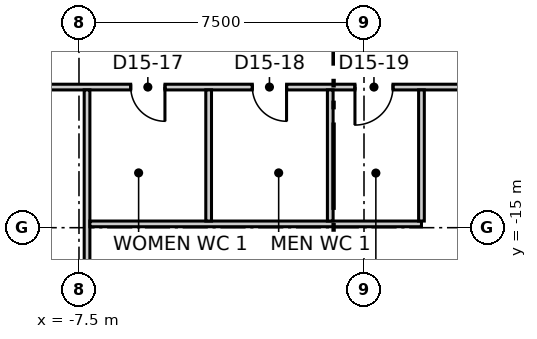
"""IFC4 building model, lengths in metres.
Left out: names, types, materials, properties, quantities, classifications, styles, units other than length and angle.
Written with IfcOpenShell. Run it as: python <this file> out.ifc"""

import sys

from ifc_helpers import new_model, si_unit, direction, frame, frame_2d, origin, place, context, subcontext, project, spatial, rectangle, extrude, element, fill, save


model = new_model("IFC4")
c1 = context("Model", 3, precision=1e-05, world=origin(), true_north=direction((0.0, 1.0)))
c2 = subcontext(c1, "Body", "Model", "MODEL_VIEW")
j1 = project(units=[si_unit("LENGTHUNIT", "METRE"), si_unit("PLANEANGLEUNIT", "RADIAN")], contexts=[c1])
p1 = place(None, origin())
s1 = spatial("IfcSite", under=j1, at=p1, CompositionType="ELEMENT")
p2 = place(p1, origin())
s2 = spatial("IfcBuilding", under=s1, at=p2, CompositionType="ELEMENT")
p3 = place(p2, frame((0.0, 0.0, 71.3)))
s3 = spatial("IfcBuildingStorey", under=s2, at=p3, CompositionType="ELEMENT", Elevation=71.3)
p4 = place(p3, frame((-3.326, 37.084, 0.0), z_axis=(0.0, 0.0, 1.0), x_axis=(-0.500000131003, -0.86602532815, 0.0)))
e1 = element("IfcWall", 1, at=p4, inside=s3, PredefinedType="ELEMENTEDWALL", context=c2, shape_type="SweptSolid", body=[
    extrude(rectangle(XDim=60.886, YDim=0.2, at=frame_2d((30.443, 0.0))), origin(), (0.0, 0.0, 1.0), 3.7),
])
p5 = place(p4, frame((2.146, 0.0, 0.9)))
e2 = element("IfcOpeningElement", 2, at=p5, cuts=e1, PredefinedType="OPENING", context=c2, shape_type="SweptSolid", body=[
    extrude(rectangle(XDim=5.6, YDim=2.5, at=frame_2d((2.8, 1.25))), frame((0.0, 0.11, 0.0), z_axis=(0.0, -1.0, 0.0), x_axis=(1.0, 0.0, 0.0)), (0.0, 0.0, 1.0), 0.22),
])
p6 = place(p4, frame((9.434, 0.0, 0.9)))
e3 = element("IfcOpeningElement", 3, at=p6, cuts=e1, PredefinedType="OPENING", context=c2, shape_type="SweptSolid", body=[
    extrude(rectangle(XDim=5.6, YDim=2.5, at=frame_2d((2.8, 1.25))), frame((0.0, 0.11, 0.0), z_axis=(0.0, -1.0, 0.0), x_axis=(1.0, 0.0, 0.0)), (0.0, 0.0, 1.0), 0.22),
])
p7 = place(p4, frame((16.721, 0.0, 0.9)))
e4 = element("IfcOpeningElement", 4, at=p7, cuts=e1, PredefinedType="OPENING", context=c2, shape_type="SweptSolid", body=[
    extrude(rectangle(XDim=5.6, YDim=2.5, at=frame_2d((2.8, 1.25))), frame((0.0, 0.11, 0.0), z_axis=(0.0, -1.0, 0.0), x_axis=(1.0, 0.0, 0.0)), (0.0, 0.0, 1.0), 0.22),
])
p8 = place(p4, frame((24.009, 0.0, 0.9)))
e5 = element("IfcOpeningElement", 5, at=p8, cuts=e1, PredefinedType="OPENING", context=c2, shape_type="SweptSolid", body=[
    extrude(rectangle(XDim=5.6, YDim=2.5, at=frame_2d((2.8, 1.25))), frame((0.0, 0.11, 0.0), z_axis=(0.0, -1.0, 0.0), x_axis=(1.0, 0.0, 0.0)), (0.0, 0.0, 1.0), 0.22),
])
p9 = place(p4, frame((31.297, 0.0, 0.9)))
e6 = element("IfcOpeningElement", 6, at=p9, cuts=e1, PredefinedType="OPENING", context=c2, shape_type="SweptSolid", body=[
    extrude(rectangle(XDim=5.6, YDim=2.5, at=frame_2d((2.8, 1.25))), frame((0.0, 0.11, 0.0), z_axis=(0.0, -1.0, 0.0), x_axis=(1.0, 0.0, 0.0)), (0.0, 0.0, 1.0), 0.22),
])
p10 = place(p4, frame((38.584, 0.0, 0.9)))
e7 = element("IfcOpeningElement", 7, at=p10, cuts=e1, PredefinedType="OPENING", context=c2, shape_type="SweptSolid", body=[
    extrude(rectangle(XDim=5.6, YDim=2.5, at=frame_2d((2.8, 1.25))), frame((0.0, 0.11, 0.0), z_axis=(0.0, -1.0, 0.0), x_axis=(1.0, 0.0, 0.0)), (0.0, 0.0, 1.0), 0.22),
])
p11 = place(p4, frame((45.872, 0.0, 0.9)))
e8 = element("IfcOpeningElement", 8, at=p11, cuts=e1, PredefinedType="OPENING", context=c2, shape_type="SweptSolid", body=[
    extrude(rectangle(XDim=5.6, YDim=2.5, at=frame_2d((2.8, 1.25))), frame((0.0, 0.11, 0.0), z_axis=(0.0, -1.0, 0.0), x_axis=(1.0, 0.0, 0.0)), (0.0, 0.0, 1.0), 0.22),
])
p12 = place(p4, frame((53.159, 0.0, 0.9)))
e9 = element("IfcOpeningElement", 9, at=p12, cuts=e1, PredefinedType="OPENING", context=c2, shape_type="SweptSolid", body=[
    extrude(rectangle(XDim=5.6, YDim=2.5, at=frame_2d((2.8, 1.25))), frame((0.0, 0.11, 0.0), z_axis=(0.0, -1.0, 0.0), x_axis=(1.0, 0.0, 0.0)), (0.0, 0.0, 1.0), 0.22),
])
p13 = place(p3, frame((-19.497, -11.17, 0.0), z_axis=(0.0, 0.0, 1.0), x_axis=(0.499998854553, 0.866026065108, 0.0)))
e10 = element("IfcWall", 10, at=p13, inside=s3, PredefinedType="PARTITIONING", context=c2, shape_type="SweptSolid", body=[
    extrude(rectangle(XDim=38.994, YDim=0.15, at=frame_2d((19.497, 0.0))), origin(), (0.0, 0.0, 1.0), 3.7),
])
p14 = place(p13, frame((35.944, 0.0, 0.0)))
e11 = element("IfcOpeningElement", 11, at=p14, cuts=e10, PredefinedType="OPENING", context=c2, shape_type="SweptSolid", body=[
    extrude(rectangle(XDim=1.1, YDim=2.1, at=frame_2d((0.55, 1.05))), frame((0.0, 0.085, 0.0), z_axis=(0.0, -1.0, 0.0), x_axis=(1.0, 0.0, 0.0)), (0.0, 0.0, 1.0), 0.17),
])
p15 = place(p13, frame((26.148, 0.0, 0.0)))
e12 = element("IfcOpeningElement", 12, at=p15, cuts=e10, PredefinedType="OPENING", context=c2, shape_type="SweptSolid", body=[
    extrude(rectangle(XDim=1.1, YDim=2.1, at=frame_2d((0.55, 1.05))), frame((0.0, 0.085, 0.0), z_axis=(0.0, -1.0, 0.0), x_axis=(1.0, 0.0, 0.0)), (0.0, 0.0, 1.0), 0.17),
])
p16 = place(p13, frame((8.572, 0.0, 0.0)))
e13 = element("IfcOpeningElement", 13, at=p16, cuts=e10, PredefinedType="OPENING", context=c2, shape_type="SweptSolid", body=[
    extrude(rectangle(XDim=1.1, YDim=2.1, at=frame_2d((0.55, 1.05))), frame((0.0, 0.085, 0.0), z_axis=(0.0, -1.0, 0.0), x_axis=(1.0, 0.0, 0.0)), (0.0, 0.0, 1.0), 0.17),
])
p17 = place(p13, frame((17.172, 0.0, 0.0)))
e14 = element("IfcOpeningElement", 14, at=p17, cuts=e10, PredefinedType="OPENING", context=c2, shape_type="SweptSolid", body=[
    extrude(rectangle(XDim=0.9, YDim=2.1, at=frame_2d((0.45, 1.05))), frame((0.0, 0.085, 0.0), z_axis=(0.0, -1.0, 0.0), x_axis=(1.0, 0.0, 0.0)), (0.0, 0.0, 1.0), 0.17),
])
p18 = place(p13, frame((14.172, 0.0, 0.0)))
e15 = element("IfcOpeningElement", 15, at=p18, cuts=e10, PredefinedType="OPENING", context=c2, shape_type="SweptSolid", body=[
    extrude(rectangle(XDim=0.9, YDim=2.1, at=frame_2d((0.45, 1.05))), frame((0.0, 0.085, 0.0), z_axis=(0.0, -1.0, 0.0), x_axis=(1.0, 0.0, 0.0)), (0.0, 0.0, 1.0), 0.17),
])
p19 = place(p13, frame((1.797, 0.0, 0.0)))
e16 = element("IfcOpeningElement", 16, at=p19, cuts=e10, PredefinedType="OPENING", context=c2, shape_type="SweptSolid", body=[
    extrude(rectangle(XDim=1.1, YDim=2.1, at=frame_2d((0.55, 1.05))), frame((0.0, 0.085, 0.0), z_axis=(0.0, -1.0, 0.0), x_axis=(1.0, 0.0, 0.0)), (0.0, 0.0, 1.0), 0.17),
])
p20 = place(p3, frame((-19.422, -11.3, 0.0), z_axis=(0.0, 0.0, 1.0), x_axis=(1.0, 0.0, 0.0)))
e17 = element("IfcWall", 17, at=p20, inside=s3, PredefinedType="PARTITIONING", context=c2, shape_type="SweptSolid", body=[
    extrude(rectangle(XDim=38.994, YDim=0.15, at=frame_2d((19.497, 0.0))), origin(), (0.0, 0.0, 1.0), 3.7),
])
p21 = place(p20, frame((1.8, 0.0, 0.0)))
e18 = element("IfcOpeningElement", 18, at=p21, cuts=e17, PredefinedType="OPENING", context=c2, shape_type="SweptSolid", body=[
    extrude(rectangle(XDim=1.1, YDim=2.1, at=frame_2d((0.55, 1.05))), frame((0.0, 0.085, 0.0), z_axis=(0.0, -1.0, 0.0), x_axis=(1.0, 0.0, 0.0)), (0.0, 0.0, 1.0), 0.17),
])
p22 = place(p20, frame((9.197, 0.0, 0.0)))
e19 = element("IfcOpeningElement", 19, at=p22, cuts=e17, PredefinedType="OPENING", context=c2, shape_type="SweptSolid", body=[
    extrude(rectangle(XDim=1.0, YDim=2.1, at=frame_2d((0.5, 1.05))), frame((0.0, 0.085, 0.0), z_axis=(0.0, -1.0, 0.0), x_axis=(1.0, 0.0, 0.0)), (0.0, 0.0, 1.0), 0.17),
])
p23 = place(p20, frame((5.597, 0.0, 0.0)))
e20 = element("IfcOpeningElement", 20, at=p23, cuts=e17, PredefinedType="OPENING", context=c2, shape_type="SweptSolid", body=[
    extrude(rectangle(XDim=0.9, YDim=2.1, at=frame_2d((0.45, 1.05))), frame((0.0, 0.085, 0.0), z_axis=(0.0, -1.0, 0.0), x_axis=(1.0, 0.0, 0.0)), (0.0, 0.0, 1.0), 0.17),
])
p24 = place(p20, frame((23.284, 0.0, 0.0)))
e21 = element("IfcOpeningElement", 21, at=p24, cuts=e17, PredefinedType="OPENING", context=c2, shape_type="SweptSolid", body=[
    extrude(rectangle(XDim=1.1, YDim=2.1, at=frame_2d((0.55, 1.05))), frame((0.0, 0.085, 0.0), z_axis=(0.0, -1.0, 0.0), x_axis=(1.0, 0.0, 0.0)), (0.0, 0.0, 1.0), 0.17),
])
p25 = place(p20, frame((13.284, 0.0, 0.0)))
e22 = element("IfcOpeningElement", 22, at=p25, cuts=e17, PredefinedType="OPENING", context=c2, shape_type="SweptSolid", body=[
    extrude(rectangle(XDim=0.9, YDim=2.1, at=frame_2d((0.45, 1.05))), frame((0.0, 0.085, 0.0), z_axis=(0.0, -1.0, 0.0), x_axis=(1.0, 0.0, 0.0)), (0.0, 0.0, 1.0), 0.17),
])
p26 = place(p20, frame((16.484, 0.0, 0.0)))
e23 = element("IfcOpeningElement", 23, at=p26, cuts=e17, PredefinedType="OPENING", context=c2, shape_type="SweptSolid", body=[
    extrude(rectangle(XDim=0.9, YDim=2.1, at=frame_2d((0.45, 1.05))), frame((0.0, 0.085, 0.0), z_axis=(0.0, -1.0, 0.0), x_axis=(1.0, 0.0, 0.0)), (0.0, 0.0, 1.0), 0.17),
])
p27 = place(p20, frame((19.184, 0.0, 0.0)))
e24 = element("IfcOpeningElement", 24, at=p27, cuts=e17, PredefinedType="OPENING", context=c2, shape_type="SweptSolid", body=[
    extrude(rectangle(XDim=1.0, YDim=2.1, at=frame_2d((0.5, 1.05))), frame((0.0, 0.085, 0.0), z_axis=(0.0, -1.0, 0.0), x_axis=(1.0, 0.0, 0.0)), (0.0, 0.0, 1.0), 0.17),
])
p28 = place(p20, frame((29.86, 0.0, 0.0)))
e25 = element("IfcOpeningElement", 25, at=p28, cuts=e17, PredefinedType="OPENING", context=c2, shape_type="SweptSolid", body=[
    extrude(rectangle(XDim=1.0, YDim=2.1, at=frame_2d((0.5, 1.05))), frame((0.0, 0.085, 0.0), z_axis=(0.0, -1.0, 0.0), x_axis=(1.0, 0.0, 0.0)), (0.0, 0.0, 1.0), 0.17),
])
p29 = place(p20, frame((35.947, 0.0, 0.0)))
e26 = element("IfcOpeningElement", 26, at=p29, cuts=e17, PredefinedType="OPENING", context=c2, shape_type="SweptSolid", body=[
    extrude(rectangle(XDim=1.0, YDim=2.1, at=frame_2d((0.5, 1.05))), frame((0.0, 0.085, 0.0), z_axis=(0.0, -1.0, 0.0), x_axis=(1.0, 0.0, 0.0)), (0.0, 0.0, 1.0), 0.17),
])
p30 = place(p3, frame((-7.288, -21.342, 0.0), z_axis=(0.0, 0.0, 1.0), x_axis=(0.0, 1.0, 0.0)))
e27 = element("IfcWall", 27, at=p30, inside=s3, PredefinedType="PARTITIONING", context=c2, shape_type="SweptSolid", body=[
    extrude(rectangle(XDim=9.967, YDim=0.15, at=frame_2d((4.983, 0.0))), origin(), (0.0, 0.0, 1.0), 3.7),
])
p31 = place(p3, frame((-7.213, -14.9, 0.0), z_axis=(0.0, 0.0, 1.0), x_axis=(1.0, 0.0, 0.0)))
e28 = element("IfcWall", 28, at=p31, inside=s3, PredefinedType="PARTITIONING", context=c2, shape_type="SweptSolid", body=[
    extrude(rectangle(XDim=8.725, YDim=0.15, at=frame_2d((4.362, 0.0))), origin(), (0.0, 0.0, 1.0), 3.7),
])
for number, where, z_axis, x_axis in (
    (29, (-4.088, -14.825, 0.0), (0.0, 0.0, 1.0), (0.0, 1.0, 0.0)),
    (30, (1.512, -14.825, 0.0), (0.0, 0.0, 1.0), (0.0, 1.0, 0.0)),
    (31, (-0.888, -14.825, 0.0), (0.0, 0.0, 1.0), (0.0, 1.0, 0.0)),
):
    element("IfcWall", number, at=place(p3, frame(where, z_axis=z_axis, x_axis=x_axis)), inside=s3, PredefinedType="PARTITIONING", context=c2, shape_type="SweptSolid", body=[
        extrude(rectangle(XDim=3.45, YDim=0.15, at=frame_2d((1.725, 0.0))), origin(), (0.0, 0.0, 1.0), 3.7),
    ])
p32 = place(p3, frame((0.075, 22.47, 0.0), z_axis=(0.0, 0.0, 1.0), x_axis=(0.500002280369, -0.866024087209, 0.0)))
e32 = element("IfcWall", 32, at=p32, inside=s3, PredefinedType="PARTITIONING", context=c2, shape_type="SweptSolid", body=[
    extrude(rectangle(XDim=38.844, YDim=0.15, at=frame_2d((19.422, 0.0))), origin(), (0.0, 0.0, 1.0), 3.7),
])
p33 = place(p32, frame((35.944, 0.0, 0.0)))
e33 = element("IfcOpeningElement", 33, at=p33, cuts=e32, PredefinedType="OPENING", context=c2, shape_type="SweptSolid", body=[
    extrude(rectangle(XDim=1.1, YDim=2.1, at=frame_2d((0.55, 1.05))), frame((0.0, 0.085, 0.0), z_axis=(0.0, -1.0, 0.0), x_axis=(1.0, 0.0, 0.0)), (0.0, 0.0, 1.0), 0.17),
])
p34 = place(p32, frame((29.848, 0.0, 0.0)))
e34 = element("IfcOpeningElement", 34, at=p34, cuts=e32, PredefinedType="OPENING", context=c2, shape_type="SweptSolid", body=[
    extrude(rectangle(XDim=1.0, YDim=2.1, at=frame_2d((0.5, 1.05))), frame((0.0, 0.085, 0.0), z_axis=(0.0, -1.0, 0.0), x_axis=(1.0, 0.0, 0.0)), (0.0, 0.0, 1.0), 0.17),
])
p35 = place(p32, frame((14.46, 0.0, 0.0)))
e35 = element("IfcOpeningElement", 35, at=p35, cuts=e32, PredefinedType="OPENING", context=c2, shape_type="SweptSolid", body=[
    extrude(rectangle(XDim=1.1, YDim=2.1, at=frame_2d((0.55, 1.05))), frame((0.0, 0.085, 0.0), z_axis=(0.0, -1.0, 0.0), x_axis=(1.0, 0.0, 0.0)), (0.0, 0.0, 1.0), 0.17),
])
p36 = place(p32, frame((24.66, 0.0, 0.0)))
e36 = element("IfcOpeningElement", 36, at=p36, cuts=e32, PredefinedType="OPENING", context=c2, shape_type="SweptSolid", body=[
    extrude(rectangle(XDim=0.9, YDim=2.1, at=frame_2d((0.45, 1.05))), frame((0.0, 0.085, 0.0), z_axis=(0.0, -1.0, 0.0), x_axis=(1.0, 0.0, 0.0)), (0.0, 0.0, 1.0), 0.17),
])
p37 = place(p32, frame((21.46, 0.0, 0.0)))
e37 = element("IfcOpeningElement", 37, at=p37, cuts=e32, PredefinedType="OPENING", context=c2, shape_type="SweptSolid", body=[
    extrude(rectangle(XDim=0.9, YDim=2.1, at=frame_2d((0.45, 1.05))), frame((0.0, 0.085, 0.0), z_axis=(0.0, -1.0, 0.0), x_axis=(1.0, 0.0, 0.0)), (0.0, 0.0, 1.0), 0.17),
])
p38 = place(p32, frame((18.66, 0.0, 0.0)))
e38 = element("IfcOpeningElement", 38, at=p38, cuts=e32, PredefinedType="OPENING", context=c2, shape_type="SweptSolid", body=[
    extrude(rectangle(XDim=1.0, YDim=2.1, at=frame_2d((0.5, 1.05))), frame((0.0, 0.085, 0.0), z_axis=(0.0, -1.0, 0.0), x_axis=(1.0, 0.0, 0.0)), (0.0, 0.0, 1.0), 0.17),
])
p39 = place(p32, frame((6.785, 0.0, 0.0)))
e39 = element("IfcOpeningElement", 39, at=p39, cuts=e32, PredefinedType="OPENING", context=c2, shape_type="SweptSolid", body=[
    extrude(rectangle(XDim=1.0, YDim=2.1, at=frame_2d((0.5, 1.05))), frame((0.0, 0.085, 0.0), z_axis=(0.0, -1.0, 0.0), x_axis=(1.0, 0.0, 0.0)), (0.0, 0.0, 1.0), 0.17),
])
p40 = place(p32, frame((10.485, 0.0, 0.0)))
e40 = element("IfcOpeningElement", 40, at=p40, cuts=e32, PredefinedType="OPENING", context=c2, shape_type="SweptSolid", body=[
    extrude(rectangle(XDim=0.9, YDim=2.1, at=frame_2d((0.45, 1.05))), frame((0.0, 0.085, 0.0), z_axis=(0.0, -1.0, 0.0), x_axis=(1.0, 0.0, 0.0)), (0.0, 0.0, 1.0), 0.17),
])
p41 = place(p32, frame((1.796, 0.0, 0.0)))
e41 = element("IfcOpeningElement", 41, at=p41, cuts=e32, PredefinedType="OPENING", context=c2, shape_type="SweptSolid", body=[
    extrude(rectangle(XDim=1.1, YDim=2.1, at=frame_2d((0.55, 1.05))), frame((0.0, 0.085, 0.0), z_axis=(0.0, -1.0, 0.0), x_axis=(1.0, 0.0, 0.0)), (0.0, 0.0, 1.0), 0.17),
])
p42 = place(p25, origin())
e42 = element("IfcDoor", 42, at=p42, inside=s3, OperationType="SINGLE_SWING_RIGHT", PredefinedType="DOOR", context=c2, shape_type="SweptSolid", body=[
    extrude(rectangle(XDim=0.9, YDim=2.1, at=frame_2d((0.45, 1.05))), frame((0.0, 0.025, 0.0), z_axis=(0.0, -1.0, 0.0), x_axis=(1.0, 0.0, 0.0)), (0.0, 0.0, 1.0), 0.05),
])
fill(e22, e42)
p43 = place(p26, origin())
e43 = element("IfcDoor", 43, at=p43, inside=s3, OperationType="SINGLE_SWING_RIGHT", PredefinedType="DOOR", context=c2, shape_type="SweptSolid", body=[
    extrude(rectangle(XDim=0.9, YDim=2.1, at=frame_2d((0.45, 1.05))), frame((0.0, 0.025, 0.0), z_axis=(0.0, -1.0, 0.0), x_axis=(1.0, 0.0, 0.0)), (0.0, 0.0, 1.0), 0.05),
])
fill(e23, e43)
p44 = place(p27, origin())
e44 = element("IfcDoor", 44, at=p44, inside=s3, OperationType="SINGLE_SWING_LEFT", PredefinedType="DOOR", context=c2, shape_type="SweptSolid", body=[
    extrude(rectangle(XDim=1.0, YDim=2.1, at=frame_2d((0.5, 1.05))), frame((0.0, 0.025, 0.0), z_axis=(0.0, -1.0, 0.0), x_axis=(1.0, 0.0, 0.0)), (0.0, 0.0, 1.0), 0.05),
])
fill(e24, e44)
save(model, sys.argv[1])
